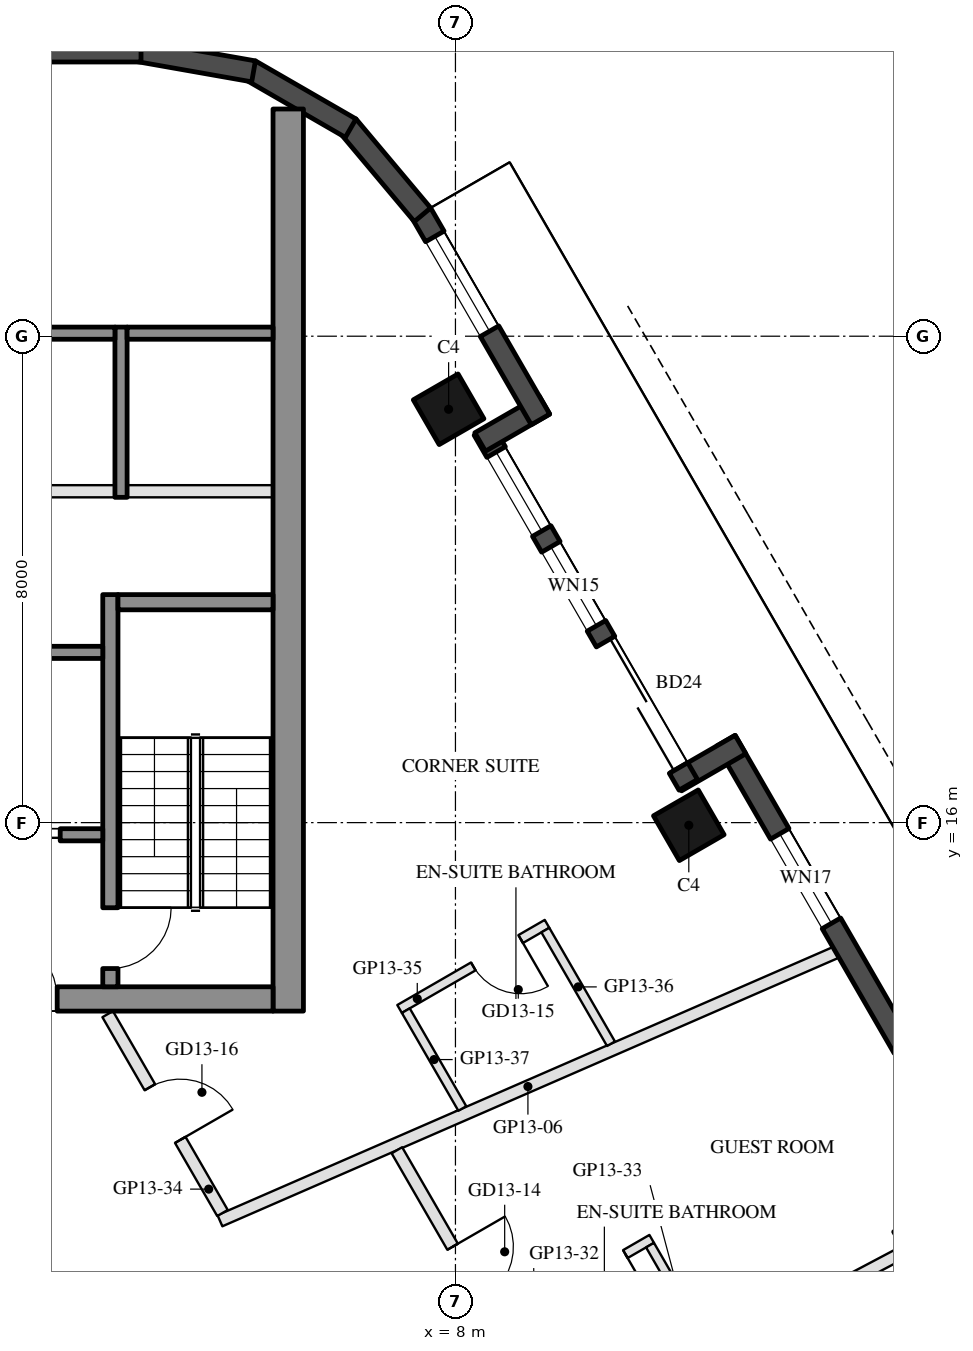
"""IFC4 building model, lengths in metres.
Left out: names, types, materials, properties, quantities, classifications, styles, units other than length and angle.
Written with IfcOpenShell. Run it as: python <this file> out.ifc"""

import sys

from ifc_helpers import new_model, si_unit, direction, frame, frame_2d, origin, origin_2d, place, context, subcontext, project, spatial, rectangle, hollow_rectangle, extrude, element, fill, save


model = new_model("IFC4")
c1 = context("Model", 3, precision=1e-05, world=origin(), true_north=direction((0.0, 1.0)))
c2 = subcontext(c1, "Body", "Model", "MODEL_VIEW")
j1 = project(units=[si_unit("LENGTHUNIT", "METRE"), si_unit("PLANEANGLEUNIT", "RADIAN")], contexts=[c1])
p1 = place(None, origin())
s1 = spatial("IfcSite", under=j1, at=p1, CompositionType="ELEMENT")
p2 = place(p1, origin())
s2 = spatial("IfcBuilding", under=s1, at=p2, CompositionType="ELEMENT")
p3 = place(p2, frame((0.0, 0.0, 154.0)))
s3 = spatial("IfcBuildingStorey", under=s2, at=p3, CompositionType="ELEMENT", Elevation=154.0)
for number, where, z_axis, x_axis in (
    (1, (15.788, 9.115, 0.0), (0.0, 0.0, 1.0), (-0.5, 0.866, 0.0)),
    (2, (11.838, 15.957, 0.0), (0.0, 0.0, 1.0), (-0.5, 0.866, 0.0)),
    (3, (7.888, 22.798, 0.0), (0.0, 0.0, 1.0), (-0.5, 0.866, 0.0)),
):
    element("IfcColumn", number, at=place(p3, frame(where, z_axis=z_axis, x_axis=x_axis)), inside=s3, PredefinedType="COLUMN", context=c2, shape_type="SweptSolid", body=[
        extrude(hollow_rectangle(XDim=0.85, YDim=0.85, WallThickness=0.04, at=origin_2d()), origin(), (0.0, 0.0, 1.0), 3.7),
    ])
p4 = place(p3, frame((17.299, 8.948, 0.0), z_axis=(0.0, 0.0, 1.0), x_axis=(-0.500010041276, 0.866019606374, 0.0)))
e4 = element("IfcWall", 4, at=p4, inside=s3, PredefinedType="SOLIDWALL", context=c2, shape_type="SweptSolid", body=[
    extrude(rectangle(XDim=9.7, YDim=0.35, at=frame_2d((4.85, 0.0))), origin(), (0.0, 0.0, 1.0), 3.55),
])
p5 = place(p4, frame((2.062, 0.0, 0.0)))
e5 = element("IfcOpeningElement", 5, at=p5, cuts=e4, PredefinedType="OPENING", context=c2, shape_type="SweptSolid", body=[
    extrude(rectangle(XDim=1.8, YDim=2.4, at=frame_2d((0.9, 1.2))), frame((0.0, 0.185, 0.0), z_axis=(0.0, -1.0, 0.0), x_axis=(1.0, 0.0, 0.0)), (0.0, 0.0, 1.0), 0.37),
])
p6 = place(p4, frame((6.23, 0.0, 0.3)))
e6 = element("IfcOpeningElement", 6, at=p6, cuts=e4, PredefinedType="OPENING", context=c2, shape_type="SweptSolid", body=[
    extrude(rectangle(XDim=1.7, YDim=2.65, at=frame_2d((0.85, 1.325))), frame((0.0, 0.185, 0.0), z_axis=(0.0, -1.0, 0.0), x_axis=(1.0, 0.0, 0.0)), (0.0, 0.0, 1.0), 0.37),
])
p7 = place(p3, frame((12.688, 17.284, 0.0), z_axis=(0.0, 0.0, 1.0), x_axis=(-0.865955602162, -0.500120880472, 0.0)))
e7 = element("IfcWall", 7, at=p7, inside=s3, PredefinedType="SOLIDWALL", context=c2, shape_type="SweptSolid", body=[
    extrude(rectangle(XDim=1.22, YDim=0.35, at=frame_2d((0.61, 0.0))), origin(), (0.0, 0.0, 1.0), 3.55),
])
p8 = place(p3, frame((11.829, 16.621, 0.0), z_axis=(0.0, 0.0, 1.0), x_axis=(-0.500003597184, 0.866023326939, 0.0)))
e8 = element("IfcWall", 8, at=p8, inside=s3, PredefinedType="SOLIDWALL", context=c2, shape_type="SweptSolid", body=[
    extrude(rectangle(XDim=6.74, YDim=0.35, at=frame_2d((3.37, 0.0))), origin(), (0.0, 0.0, 1.0), 3.55),
])
p9 = place(p8, frame((0.32, 0.0, 0.0)))
e9 = element("IfcOpeningElement", 9, at=p9, cuts=e8, PredefinedType="OPENING", context=c2, shape_type="SweptSolid", body=[
    extrude(rectangle(XDim=2.4, YDim=2.4, at=frame_2d((1.2, 1.2))), frame((0.0, 0.185, 0.0), z_axis=(0.0, -1.0, 0.0), x_axis=(1.0, 0.0, 0.0)), (0.0, 0.0, 1.0), 0.37),
])
p10 = place(p8, frame((3.02, 0.0, 0.3)))
e10 = element("IfcOpeningElement", 10, at=p10, cuts=e8, PredefinedType="OPENING", context=c2, shape_type="SweptSolid", body=[
    extrude(rectangle(XDim=1.5, YDim=2.65, at=frame_2d((0.75, 1.325))), frame((0.0, 0.185, 0.0), z_axis=(0.0, -1.0, 0.0), x_axis=(1.0, 0.0, 0.0)), (0.0, 0.0, 1.0), 0.37),
])
p11 = place(p8, frame((4.82, 0.0, 0.3)))
e11 = element("IfcOpeningElement", 11, at=p11, cuts=e8, PredefinedType="OPENING", context=c2, shape_type="SweptSolid", body=[
    extrude(rectangle(XDim=1.5, YDim=2.65, at=frame_2d((0.75, 1.325))), frame((0.0, 0.185, 0.0), z_axis=(0.0, -1.0, 0.0), x_axis=(1.0, 0.0, 0.0)), (0.0, 0.0, 1.0), 0.37),
])
p12 = place(p3, frame((8.406, 22.26, 0.0), z_axis=(0.0, 0.0, 1.0), x_axis=(0.865955602162, 0.500120880472, 0.0)))
e12 = element("IfcWall", 12, at=p12, inside=s3, PredefinedType="SOLIDWALL", context=c2, shape_type="SweptSolid", body=[
    extrude(rectangle(XDim=1.22, YDim=0.35, at=frame_2d((0.61, 0.0))), origin(), (0.0, 0.0, 1.0), 3.55),
])
p13 = place(p3, frame((9.398, 22.631, 0.0), z_axis=(0.0, 0.0, 1.0), x_axis=(-0.499954521343, 0.866051659307, 0.0)))
e13 = element("IfcWall", 13, at=p13, inside=s3, PredefinedType="SOLIDWALL", context=c2, shape_type="SweptSolid", body=[
    extrude(rectangle(XDim=3.916, YDim=0.35, at=frame_2d((1.958, 0.0))), origin(), (0.0, 0.0, 1.0), 3.55),
])
p14 = place(p13, frame((1.675, 0.0, 0.3)))
e14 = element("IfcOpeningElement", 14, at=p14, cuts=e13, PredefinedType="OPENING", context=c2, shape_type="SweptSolid", body=[
    extrude(rectangle(XDim=1.8, YDim=2.65, at=frame_2d((0.9, 1.325))), frame((0.0, 0.185, 0.0), z_axis=(0.0, -1.0, 0.0), x_axis=(1.0, 0.0, 0.0)), (0.0, 0.0, 1.0), 0.37),
])
p15 = place(p3, frame((7.458, 25.998, 0.0), z_axis=(0.0, 0.0, 1.0), x_axis=(-0.642808304945, 0.766027077259, 0.0)))
e15 = element("IfcWall", 15, at=p15, inside=s3, PredefinedType="SOLIDWALL", context=c2, shape_type="SweptSolid", body=[
    extrude(rectangle(XDim=1.91, YDim=0.35, at=frame_2d((0.955, 0.0))), origin(), (0.0, 0.0, 1.0), 3.55),
])
for number, where, z_axis, x_axis in (
    (16, (6.277, 27.422, 0.0), (0.0, 0.0, 1.0), (-0.866, 0.5, 0.0)),
    (17, (4.68, 28.356, 0.0), (0.0, 0.0, 1.0), (-0.985, 0.174, 0.0)),
):
    element("IfcWall", number, at=place(p3, frame(where, z_axis=z_axis, x_axis=x_axis)), inside=s3, PredefinedType="SOLIDWALL", context=c2, shape_type="SweptSolid", body=[
        extrude(rectangle(XDim=1.91, YDim=0.35, at=frame_2d((0.955, 0.0))), origin(), (0.0, 0.0, 1.0), 3.55),
    ])
p16 = place(p3, frame((2.829, 28.685, 0.0), z_axis=(0.0, 0.0, 1.0), x_axis=(-1.0, 0.0, 0.0)))
e18 = element("IfcWall", 18, at=p16, inside=s3, PredefinedType="SOLIDWALL", context=c2, shape_type="SweptSolid", body=[
    extrude(rectangle(XDim=5.658, YDim=0.35, at=frame_2d((2.829, 0.0))), origin(), (0.0, 0.0, 1.0), 3.55),
])
p17 = place(p3, frame((5.25, 12.9, 0.0), z_axis=(0.0, 0.0, 1.0), x_axis=(0.0, 1.0, 0.0)))
e19 = element("IfcWall", 19, at=p17, inside=s3, PredefinedType="SHEAR", context=c2, shape_type="SweptSolid", body=[
    extrude(rectangle(XDim=14.837, YDim=0.5, at=frame_2d((7.418, 0.0))), origin(), (0.0, 0.0, 1.0), 3.5),
])
p18 = place(p3, frame((5.0, 13.1, 0.0), z_axis=(0.0, 0.0, 1.0), x_axis=(-1.0, 0.0, 0.0)))
e20 = element("IfcWall", 20, at=p18, inside=s3, PredefinedType="SHEAR", context=c2, shape_type="SweptSolid", body=[
    extrude(rectangle(XDim=10.0, YDim=0.4, at=frame_2d((5.0, 0.0))), origin(), (0.0, 0.0, 1.0), 3.5),
])
p19 = place(p18, frame((3.55, 0.0, 0.0)))
e21 = element("IfcOpeningElement", 21, at=p19, cuts=e20, PredefinedType="OPENING", context=c2, shape_type="SweptSolid", body=[
    extrude(rectangle(XDim=1.1, YDim=2.1, at=frame_2d((0.55, 1.05))), frame((0.0, 0.21, 0.0), z_axis=(0.0, -1.0, 0.0), x_axis=(1.0, 0.0, 0.0)), (0.0, 0.0, 1.0), 0.42),
])
p20 = place(p18, frame((5.85, 0.0, 0.0)))
e22 = element("IfcOpeningElement", 22, at=p20, cuts=e20, PredefinedType="OPENING", context=c2, shape_type="SweptSolid", body=[
    extrude(rectangle(XDim=1.4, YDim=2.1, at=frame_2d((0.7, 1.05))), frame((0.0, 0.21, 0.0), z_axis=(0.0, -1.0, 0.0), x_axis=(1.0, 0.0, 0.0)), (0.0, 0.0, 1.0), 0.42),
])
p21 = place(p3, frame((2.325, 13.3, 0.0), z_axis=(0.0, 0.0, 1.0), x_axis=(0.0, 1.0, 0.0)))
e23 = element("IfcWall", 23, at=p21, inside=s3, PredefinedType="SHEAR", context=c2, shape_type="SweptSolid", body=[
    extrude(rectangle(XDim=6.45, YDim=0.25, at=frame_2d((3.225, 0.0))), origin(), (0.0, 0.0, 1.0), 3.5),
])
p22 = place(p21, frame((0.3, 0.0, 0.0)))
e24 = element("IfcOpeningElement", 24, at=p22, cuts=e23, PredefinedType="OPENING", context=c2, shape_type="SweptSolid", body=[
    extrude(rectangle(XDim=1.0, YDim=2.1, at=frame_2d((0.5, 1.05))), frame((0.0, 0.135, 0.0), z_axis=(0.0, -1.0, 0.0), x_axis=(1.0, 0.0, 0.0)), (0.0, 0.0, 1.0), 0.27),
])
p23 = place(p3, frame((5.0, 19.625, 0.0), z_axis=(0.0, 0.0, 1.0), x_axis=(-1.0, 0.0, 0.0)))
e25 = element("IfcWall", 25, at=p23, inside=s3, PredefinedType="SHEAR", context=c2, shape_type="SweptSolid", body=[
    extrude(rectangle(XDim=2.55, YDim=0.25, at=frame_2d((1.275, 0.0))), origin(), (0.0, 0.0, 1.0), 3.5),
])
p24 = place(p3, frame((2.2, 18.8, 0.0), z_axis=(0.0, 0.0, 1.0), x_axis=(-1.0, 0.0, 0.0)))
e26 = element("IfcWall", 26, at=p24, inside=s3, PredefinedType="SHEAR", context=c2, shape_type="SweptSolid", body=[
    extrude(rectangle(XDim=2.8, YDim=0.2, at=frame_2d((1.4, 0.0))), origin(), (0.0, 0.0, 1.0), 3.5),
])
p25 = place(p3, frame((2.2, 15.8, 0.0), z_axis=(0.0, 0.0, 1.0), x_axis=(-1.0, 0.0, 0.0)))
e27 = element("IfcWall", 27, at=p25, inside=s3, PredefinedType="SHEAR", context=c2, shape_type="SweptSolid", body=[
    extrude(rectangle(XDim=2.8, YDim=0.2, at=frame_2d((1.4, 0.0))), origin(), (0.0, 0.0, 1.0), 3.5),
])
p26 = place(p25, frame((0.7, 0.0, 0.0)))
e28 = element("IfcOpeningElement", 28, at=p26, cuts=e27, PredefinedType="OPENING", context=c2, shape_type="SweptSolid", body=[
    extrude(rectangle(XDim=1.2, YDim=2.1, at=frame_2d((0.6, 1.05))), frame((0.0, 0.11, 0.0), z_axis=(0.0, -1.0, 0.0), x_axis=(1.0, 0.0, 0.0)), (0.0, 0.0, 1.0), 0.22),
])
p27 = place(p3, frame((2.5, 21.35, 0.0), z_axis=(0.0, 0.0, 1.0), x_axis=(0.0, 1.0, 0.0)))
e29 = element("IfcWall", 29, at=p27, inside=s3, PredefinedType="SHEAR", context=c2, shape_type="SweptSolid", body=[
    extrude(rectangle(XDim=2.8, YDim=0.2, at=frame_2d((1.4, 0.0))), origin(), (0.0, 0.0, 1.0), 3.5),
])
p28 = place(p3, frame((5.0, 24.05, 0.0), z_axis=(0.0, 0.0, 1.0), x_axis=(-1.0, 0.0, 0.0)))
e30 = element("IfcWall", 30, at=p28, inside=s3, PredefinedType="SHEAR", context=c2, shape_type="SweptSolid", body=[
    extrude(rectangle(XDim=2.4, YDim=0.2, at=frame_2d((1.2, 0.0))), origin(), (0.0, 0.0, 1.0), 3.5),
])
p29 = place(p3, frame((2.4, 24.05, 0.0), z_axis=(0.0, 0.0, 1.0), x_axis=(-1.0, 0.0, 0.0)))
e31 = element("IfcWall", 31, at=p29, inside=s3, PredefinedType="SHEAR", context=c2, shape_type="SweptSolid", body=[
    extrude(rectangle(XDim=2.8, YDim=0.2, at=frame_2d((1.4, 0.0))), origin(), (0.0, 0.0, 1.0), 3.5),
])
p30 = place(p3, frame((5.0, 21.45, 0.0), z_axis=(0.0, 0.0, 1.0), x_axis=(-1.0, 0.0, 0.0)))
e32 = element("IfcWall", 32, at=p30, inside=s3, PredefinedType="PARTITIONING", context=c2, shape_type="SweptSolid", body=[
    extrude(rectangle(XDim=2.4, YDim=0.2, at=frame_2d((1.2, 0.0))), origin(), (0.0, 0.0, 1.0), 3.5),
])
p31 = place(p3, frame((2.4, 21.45, 0.0), z_axis=(0.0, 0.0, 1.0), x_axis=(-1.0, 0.0, 0.0)))
e33 = element("IfcWall", 33, at=p31, inside=s3, PredefinedType="PARTITIONING", context=c2, shape_type="SweptSolid", body=[
    extrude(rectangle(XDim=2.8, YDim=0.2, at=frame_2d((1.4, 0.0))), origin(), (0.0, 0.0, 1.0), 3.5),
])
p32 = place(p3, frame((15.392, 8.95, 0.0), z_axis=(0.0, 0.0, 1.0), x_axis=(-0.883969397176, -0.467544762408, 0.0)))
e34 = element("IfcWall", 34, at=p32, inside=s3, PredefinedType="PARTITIONING", context=c2, shape_type="SweptSolid", body=[
    extrude(rectangle(XDim=6.51, YDim=0.2, at=frame_2d((3.255, 0.0))), origin(), (0.0, 0.0, 1.0), 2.95),
])
p33 = place(p3, frame((14.257, 13.866, 0.0), z_axis=(0.0, 0.0, 1.0), x_axis=(-0.916761733334, -0.399434505638, 0.0)))
e35 = element("IfcWall", 35, at=p33, inside=s3, PredefinedType="PARTITIONING", context=c2, shape_type="SweptSolid", body=[
    extrude(rectangle(XDim=11.05, YDim=0.2, at=frame_2d((5.525, 0.0))), origin(), (0.0, 0.0, 1.0), 3.06),
])
p34 = place(p3, frame((7.037, 10.611, 0.0), z_axis=(0.0, 0.0, 1.0), x_axis=(0.500004030971, -0.86602307649, 0.0)))
e36 = element("IfcWall", 36, at=p34, inside=s3, PredefinedType="PARTITIONING", context=c2, shape_type="SweptSolid", body=[
    extrude(rectangle(XDim=5.279, YDim=0.2, at=frame_2d((2.639, 0.0))), origin(), (0.0, 0.0, 1.0), 2.95),
])
p35 = place(p34, frame((1.833, 0.0, 0.0)))
e37 = element("IfcOpeningElement", 37, at=p35, cuts=e36, PredefinedType="OPENING", context=c2, shape_type="SweptSolid", body=[
    extrude(rectangle(XDim=1.0, YDim=2.1, at=frame_2d((0.5, 1.05))), frame((0.0, 0.11, 0.0), z_axis=(0.0, -1.0, 0.0), x_axis=(1.0, 0.0, 0.0)), (0.0, 0.0, 1.0), 0.22),
])
p36 = place(p3, frame((11.227, 9.154, 0.0), z_axis=(0.0, 0.0, 1.0), x_axis=(-0.866034573852, -0.49998411664, 0.0)))
e38 = element("IfcWall", 38, at=p36, inside=s3, PredefinedType="PARTITIONING", context=c2, shape_type="SweptSolid", body=[
    extrude(rectangle(XDim=2.8, YDim=0.15, at=frame_2d((1.4, 0.0))), origin(), (0.0, 0.0, 1.0), 3.55),
])
p37 = place(p36, frame((0.5, 0.0, 0.0)))
e39 = element("IfcOpeningElement", 39, at=p37, cuts=e38, PredefinedType="OPENING", context=c2, shape_type="SweptSolid", body=[
    extrude(rectangle(XDim=0.9, YDim=2.1, at=frame_2d((0.45, 1.05))), frame((0.0, 0.085, 0.0), z_axis=(0.0, -1.0, 0.0), x_axis=(1.0, 0.0, 0.0)), (0.0, 0.0, 1.0), 0.17),
])
p38 = place(p3, frame((12.175, 7.362, 0.0), z_axis=(0.0, 0.0, 1.0), x_axis=(-0.500014901547, 0.866016800201, 0.0)))
e40 = element("IfcWall", 40, at=p38, inside=s3, PredefinedType="PARTITIONING", context=c2, shape_type="SweptSolid", body=[
    extrude(rectangle(XDim=1.951, YDim=0.15, at=frame_2d((0.976, 0.0))), origin(), (0.0, 0.0, 1.0), 3.55),
])
p39 = place(p3, frame((2.281, 12.85, 0.0), z_axis=(0.0, 0.0, 1.0), x_axis=(0.499991068497, -0.866030560329, 0.0)))
e41 = element("IfcWall", 41, at=p39, inside=s3, PredefinedType="PARTITIONING", context=c2, shape_type="SweptSolid", body=[
    extrude(rectangle(XDim=3.776, YDim=0.2, at=frame_2d((1.888, 0.0))), origin(), (0.0, 0.0, 1.0), 2.95),
])
p40 = place(p39, frame((1.388, 0.0, 0.0)))
e42 = element("IfcOpeningElement", 42, at=p40, cuts=e41, PredefinedType="OPENING", context=c2, shape_type="SweptSolid", body=[
    extrude(rectangle(XDim=1.0, YDim=2.1, at=frame_2d((0.5, 1.05))), frame((0.0, 0.11, 0.0), z_axis=(0.0, -1.0, 0.0), x_axis=(1.0, 0.0, 0.0)), (0.0, 0.0, 1.0), 0.22),
])
p41 = place(p3, frame((9.506, 14.335, 0.0), z_axis=(0.0, 0.0, 1.0), x_axis=(-0.866056369097, -0.49994636267, 0.0)))
e43 = element("IfcWall", 43, at=p41, inside=s3, PredefinedType="PARTITIONING", context=c2, shape_type="SweptSolid", body=[
    extrude(rectangle(XDim=2.8, YDim=0.15, at=frame_2d((1.4, 0.0))), origin(), (0.0, 0.0, 1.0), 3.55),
])
p42 = place(p41, frame((0.5, 0.0, 0.0)))
e44 = element("IfcOpeningElement", 44, at=p42, cuts=e43, PredefinedType="OPENING", context=c2, shape_type="SweptSolid", body=[
    extrude(rectangle(XDim=0.9, YDim=2.1, at=frame_2d((0.45, 1.05))), frame((0.0, 0.085, 0.0), z_axis=(0.0, -1.0, 0.0), x_axis=(1.0, 0.0, 0.0)), (0.0, 0.0, 1.0), 0.17),
])
p43 = place(p3, frame((10.558, 12.364, 0.0), z_axis=(0.0, 0.0, 1.0), x_axis=(-0.499983569942, 0.866034889475, 0.0)))
e45 = element("IfcWall", 45, at=p43, inside=s3, PredefinedType="PARTITIONING", context=c2, shape_type="SweptSolid", body=[
    extrude(rectangle(XDim=2.158, YDim=0.15, at=frame_2d((1.079, 0.0))), origin(), (0.0, 0.0, 1.0), 3.55),
])
p44 = place(p3, frame((8.113, 11.298, 0.0), z_axis=(0.0, 0.0, 1.0), x_axis=(-0.49995366312, 0.866052154742, 0.0)))
e46 = element("IfcWall", 46, at=p44, inside=s3, PredefinedType="PARTITIONING", context=c2, shape_type="SweptSolid", body=[
    extrude(rectangle(XDim=1.859, YDim=0.15, at=frame_2d((0.929, 0.0))), origin(), (0.0, 0.0, 1.0), 3.55),
])
p45 = place(p6, origin())
e47 = element("IfcWindow", 47, at=p45, inside=s3, PartitioningType="SINGLE_PANEL", PredefinedType="WINDOW", context=c2, shape_type="SweptSolid", body=[
    extrude(rectangle(XDim=1.7, YDim=2.65, at=frame_2d((0.85, 1.325))), frame((0.0, 0.03, 0.0), z_axis=(0.0, -1.0, 0.0), x_axis=(1.0, 0.0, 0.0)), (0.0, 0.0, 1.0), 0.06),
])
fill(e6, e47)
p46 = place(p9, frame((2.4, 0.0, 0.0), z_axis=(0.0, 0.0, 1.0), x_axis=(-1.0, 0.0, 0.0)))
e48 = element("IfcDoor", 48, at=p46, inside=s3, OperationType="SLIDING_TO_LEFT", PredefinedType="DOOR", context=c2, shape_type="SweptSolid", body=[
    extrude(rectangle(XDim=2.4, YDim=2.4, at=frame_2d((1.2, 1.2))), frame((0.0, 0.025, 0.0), z_axis=(0.0, -1.0, 0.0), x_axis=(1.0, 0.0, 0.0)), (0.0, 0.0, 1.0), 0.05),
])
fill(e9, e48)
p47 = place(p10, origin())
e49 = element("IfcWindow", 49, at=p47, inside=s3, PartitioningType="SINGLE_PANEL", PredefinedType="WINDOW", context=c2, shape_type="SweptSolid", body=[
    extrude(rectangle(XDim=1.5, YDim=2.65, at=frame_2d((0.75, 1.325))), frame((0.0, 0.03, 0.0), z_axis=(0.0, -1.0, 0.0), x_axis=(1.0, 0.0, 0.0)), (0.0, 0.0, 1.0), 0.06),
])
fill(e10, e49)
p48 = place(p11, origin())
e50 = element("IfcWindow", 50, at=p48, inside=s3, PartitioningType="SINGLE_PANEL", PredefinedType="WINDOW", context=c2, shape_type="SweptSolid", body=[
    extrude(rectangle(XDim=1.5, YDim=2.65, at=frame_2d((0.75, 1.325))), frame((0.0, 0.03, 0.0), z_axis=(0.0, -1.0, 0.0), x_axis=(1.0, 0.0, 0.0)), (0.0, 0.0, 1.0), 0.06),
])
fill(e11, e50)
p49 = place(p14, origin())
e51 = element("IfcWindow", 51, at=p49, inside=s3, PartitioningType="SINGLE_PANEL", PredefinedType="WINDOW", context=c2, shape_type="SweptSolid", body=[
    extrude(rectangle(XDim=1.8, YDim=2.65, at=frame_2d((0.9, 1.325))), frame((0.0, 0.03, 0.0), z_axis=(0.0, -1.0, 0.0), x_axis=(1.0, 0.0, 0.0)), (0.0, 0.0, 1.0), 0.06),
])
fill(e14, e51)
p50 = place(p26, origin())
e52 = element("IfcDoor", 52, at=p50, inside=s3, OperationType="DOUBLE_DOOR_SLIDING", PredefinedType="DOOR", context=c2, shape_type="SweptSolid", body=[
    extrude(rectangle(XDim=1.2, YDim=2.1, at=frame_2d((0.6, 1.05))), frame((0.0, 0.025, 0.0), z_axis=(0.0, -1.0, 0.0), x_axis=(1.0, 0.0, 0.0)), (0.0, 0.0, 1.0), 0.05),
])
fill(e28, e52)
p51 = place(p19, frame((1.1, 0.0, 0.0), z_axis=(0.0, 0.0, 1.0), x_axis=(-1.0, 0.0, 0.0)))
e53 = element("IfcDoor", 53, at=p51, inside=s3, OperationType="SINGLE_SWING_LEFT", PredefinedType="DOOR", context=c2, shape_type="SweptSolid", body=[
    extrude(rectangle(XDim=1.1, YDim=2.1, at=frame_2d((0.55, 1.05))), frame((0.0, 0.025, 0.0), z_axis=(0.0, -1.0, 0.0), x_axis=(1.0, 0.0, 0.0)), (0.0, 0.0, 1.0), 0.05),
])
fill(e21, e53)
p52 = place(p22, frame((1.0, 0.0, 0.0), z_axis=(0.0, 0.0, 1.0), x_axis=(-1.0, 0.0, 0.0)))
e54 = element("IfcDoor", 54, at=p52, inside=s3, OperationType="SINGLE_SWING_LEFT", PredefinedType="DOOR", context=c2, shape_type="SweptSolid", body=[
    extrude(rectangle(XDim=1.0, YDim=2.1, at=frame_2d((0.5, 1.05))), frame((0.0, 0.025, 0.0), z_axis=(0.0, -1.0, 0.0), x_axis=(1.0, 0.0, 0.0)), (0.0, 0.0, 1.0), 0.05),
])
fill(e24, e54)
p53 = place(p37, origin())
e55 = element("IfcDoor", 55, at=p53, inside=s3, OperationType="SINGLE_SWING_LEFT", PredefinedType="DOOR", context=c2, shape_type="SweptSolid", body=[
    extrude(rectangle(XDim=0.9, YDim=2.1, at=frame_2d((0.45, 1.05))), frame((0.0, 0.025, 0.0), z_axis=(0.0, -1.0, 0.0), x_axis=(1.0, 0.0, 0.0)), (0.0, 0.0, 1.0), 0.05),
])
fill(e39, e55)
p54 = place(p35, origin())
e56 = element("IfcDoor", 56, at=p54, inside=s3, OperationType="SINGLE_SWING_LEFT", PredefinedType="DOOR", context=c2, shape_type="SweptSolid", body=[
    extrude(rectangle(XDim=1.0, YDim=2.1, at=frame_2d((0.5, 1.05))), frame((0.0, 0.025, 0.0), z_axis=(0.0, -1.0, 0.0), x_axis=(1.0, 0.0, 0.0)), (0.0, 0.0, 1.0), 0.05),
])
fill(e37, e56)
p55 = place(p42, origin())
e57 = element("IfcDoor", 57, at=p55, inside=s3, OperationType="SINGLE_SWING_LEFT", PredefinedType="DOOR", context=c2, shape_type="SweptSolid", body=[
    extrude(rectangle(XDim=0.9, YDim=2.1, at=frame_2d((0.45, 1.05))), frame((0.0, 0.025, 0.0), z_axis=(0.0, -1.0, 0.0), x_axis=(1.0, 0.0, 0.0)), (0.0, 0.0, 1.0), 0.05),
])
fill(e44, e57)
p56 = place(p40, origin())
e58 = element("IfcDoor", 58, at=p56, inside=s3, OperationType="SINGLE_SWING_RIGHT", PredefinedType="DOOR", context=c2, shape_type="SweptSolid", body=[
    extrude(rectangle(XDim=1.0, YDim=2.1, at=frame_2d((0.5, 1.05))), frame((0.0, 0.025, 0.0), z_axis=(0.0, -1.0, 0.0), x_axis=(1.0, 0.0, 0.0)), (0.0, 0.0, 1.0), 0.05),
])
fill(e42, e58)
save(model, sys.argv[1])
